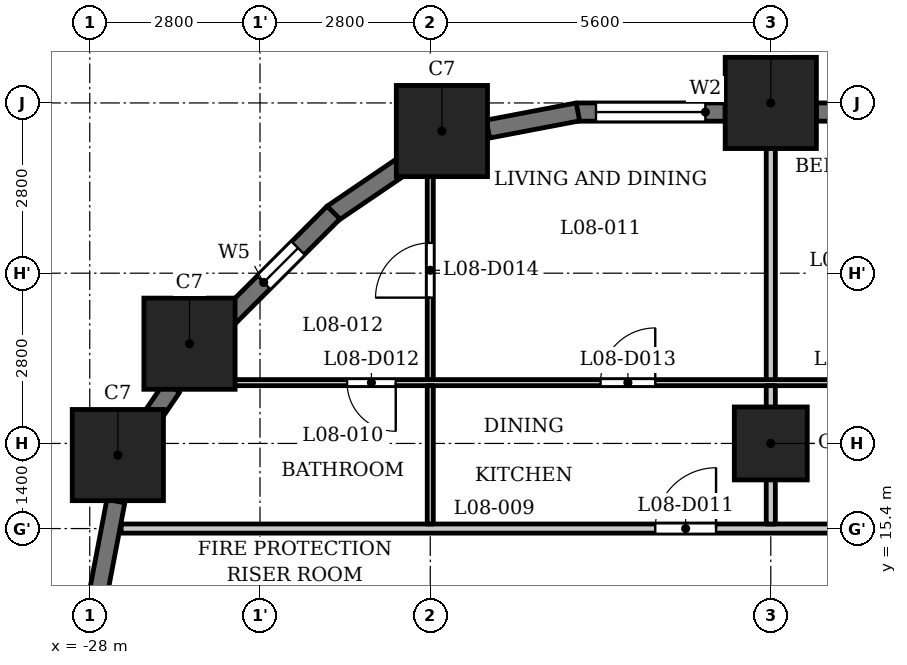
"""IFC4 building model, lengths in metres.
Left out: names, types, materials, properties, quantities, classifications, styles, units other than length and angle.
Written with IfcOpenShell. Run it as: python <this file> out.ifc"""

import sys

from ifc_helpers import new_model, si_unit, direction, frame, frame_2d, origin, origin_2d, place, context, subcontext, project, spatial, rectangle, extrude, element, fill, save


model = new_model("IFC4")
c1 = context("Model", 3, precision=1e-05, world=origin(), true_north=direction((0.0, 1.0)))
c2 = subcontext(c1, "Body", "Model", "MODEL_VIEW")
j1 = project(units=[si_unit("LENGTHUNIT", "METRE"), si_unit("PLANEANGLEUNIT", "RADIAN")], contexts=[c1])
p1 = place(None, origin())
s1 = spatial("IfcSite", under=j1, at=p1, CompositionType="ELEMENT")
p2 = place(p1, origin())
s2 = spatial("IfcBuilding", under=s1, at=p2, CompositionType="ELEMENT")
p3 = place(p2, frame((0.0, 0.0, 37.5)))
s3 = spatial("IfcBuildingStorey", under=s2, at=p3, CompositionType="ELEMENT", Elevation=37.5)
for number, where, z_axis, x_axis in (
    (1, (-16.8, 22.4, 0.0), (0.0, 0.0, 1.0), (1.0, 0.0, 0.0)),
    (2, (-22.209, 21.938, 0.0), (0.0, 0.0, 1.0), (1.0, 0.0, 0.0)),
    (3, (-26.36, 18.44, 0.0), (0.0, 0.0, 1.0), (1.0, 0.0, 0.0)),
    (4, (-27.538, 16.609, 0.0), (0.0, 0.0, 1.0), (1.0, 0.0, 0.0)),
):
    element("IfcColumn", number, at=place(p3, frame(where, z_axis=z_axis, x_axis=x_axis)), inside=s3, PredefinedType="COLUMN", context=c2, shape_type="SweptSolid", body=[
        extrude(rectangle(XDim=1.5, YDim=1.5, at=origin_2d()), origin(), (0.0, 0.0, 1.0), 3.5),
    ])
p4 = place(p3, frame((-16.8, 16.8, 0.0), z_axis=(0.0, 0.0, 1.0), x_axis=(1.0, 0.0, 0.0)))
e5 = element("IfcColumn", 5, at=p4, inside=s3, PredefinedType="COLUMN", context=c2, shape_type="SweptSolid", body=[
    extrude(rectangle(XDim=1.2, YDim=1.2, at=origin_2d()), origin(), (0.0, 0.0, 1.0), 3.5),
])
p5 = place(p3, frame((-11.95, 22.25, 0.0), z_axis=(0.0, 0.0, 1.0), x_axis=(-1.0, 0.0, 0.0)))
e6 = element("IfcWall", 6, at=p5, inside=s3, PredefinedType="SOLIDWALL", context=c2, shape_type="SweptSolid", body=[
    extrude(rectangle(XDim=4.1, YDim=0.3, at=frame_2d((2.05, 0.0))), origin(), (0.0, 0.0, 1.0), 2.35),
])
p6 = place(p5, frame((0.488, 0.0, 0.6)))
e7 = element("IfcOpeningElement", 7, at=p6, cuts=e6, PredefinedType="OPENING", context=c2, shape_type="SweptSolid", body=[
    extrude(rectangle(XDim=1.2, YDim=1.55, at=frame_2d((0.6, 0.775))), frame((0.0, 0.16, 0.0), z_axis=(0.0, -1.0, 0.0), x_axis=(1.0, 0.0, 0.0)), (0.0, 0.0, 1.0), 0.32),
])
p7 = place(p5, frame((2.613, 0.0, 0.6)))
e8 = element("IfcOpeningElement", 8, at=p7, cuts=e6, PredefinedType="OPENING", context=c2, shape_type="SweptSolid", body=[
    extrude(rectangle(XDim=1.2, YDim=1.55, at=frame_2d((0.6, 0.775))), frame((0.0, 0.16, 0.0), z_axis=(0.0, -1.0, 0.0), x_axis=(1.0, 0.0, 0.0)), (0.0, 0.0, 1.0), 0.32),
])
p8 = place(p3, frame((-17.55, 22.25, 0.0), z_axis=(0.0, 0.0, 1.0), x_axis=(-1.0, 0.0, 0.0)))
e9 = element("IfcWall", 9, at=p8, inside=s3, PredefinedType="SOLIDWALL", context=c2, shape_type="SweptSolid", body=[
    extrude(rectangle(XDim=2.45, YDim=0.3, at=frame_2d((1.225, 0.0))), origin(), (0.0, 0.0, 1.0), 2.35),
])
p9 = place(p8, frame((0.325, 0.0, 0.9)))
e10 = element("IfcOpeningElement", 10, at=p9, cuts=e9, PredefinedType="OPENING", context=c2, shape_type="SweptSolid", body=[
    extrude(rectangle(XDim=1.8, YDim=1.25, at=frame_2d((0.9, 0.625))), frame((0.0, 0.16, 0.0), z_axis=(0.0, -1.0, 0.0), x_axis=(1.0, 0.0, 0.0)), (0.0, 0.0, 1.0), 0.32),
])
for number, where, z_axis, x_axis in (
    (11, (-19.972, 22.253, 0.0), (0.0, 0.0, 1.0), (-0.982, -0.187, 0.0)),
    (12, (-22.767, 21.426, 0.0), (0.0, 0.0, 1.0), (-0.827, -0.562, 0.0)),
):
    element("IfcWall", number, at=place(p3, frame(where, z_axis=z_axis, x_axis=x_axis)), inside=s3, PredefinedType="SOLIDWALL", context=c2, shape_type="SweptSolid", body=[
        extrude(rectangle(XDim=1.506, YDim=0.3, at=frame_2d((0.753, 0.0))), origin(), (0.0, 0.0, 1.0), 2.35),
    ])
p10 = place(p3, frame((-23.991, 20.597, 0.0), z_axis=(0.0, 0.0, 1.0), x_axis=(-0.707106781187, -0.707106781187, 0.0)))
e13 = element("IfcWall", 13, at=p10, inside=s3, PredefinedType="SOLIDWALL", context=c2, shape_type="SweptSolid", body=[
    extrude(rectangle(XDim=2.45, YDim=0.3, at=frame_2d((1.225, 0.0))), origin(), (0.0, 0.0, 1.0), 2.35),
])
p11 = place(p10, frame((0.825, 0.0, 0.6)))
e14 = element("IfcOpeningElement", 14, at=p11, cuts=e13, PredefinedType="OPENING", context=c2, shape_type="SweptSolid", body=[
    extrude(rectangle(XDim=0.8, YDim=1.55, at=frame_2d((0.4, 0.775))), frame((0.0, 0.16, 0.0), z_axis=(0.0, -1.0, 0.0), x_axis=(1.0, 0.0, 0.0)), (0.0, 0.0, 1.0), 0.32),
])
p12 = place(p3, frame((-26.645, 17.727, 0.0), z_axis=(0.0, 0.0, 1.0), x_axis=(-0.562083182981, -0.827080706709, 0.0)))
e15 = element("IfcWall", 15, at=p12, inside=s3, PredefinedType="SOLIDWALL", context=c2, shape_type="SweptSolid", body=[
    extrude(rectangle(XDim=0.677, YDim=0.3, at=frame_2d((0.339, 0.0))), origin(), (0.0, 0.0, 1.0), 3.2),
])
p13 = place(p3, frame((-27.571, 15.851, 0.0), z_axis=(0.0, 0.0, 1.0), x_axis=(-0.187223837635, -0.982317277982, 0.0)))
e16 = element("IfcWall", 16, at=p13, inside=s3, PredefinedType="SOLIDWALL", context=c2, shape_type="SweptSolid", body=[
    extrude(rectangle(XDim=1.506, YDim=0.3, at=frame_2d((0.753, 0.0))), origin(), (0.0, 0.0, 1.0), 2.35),
])
p14 = place(p3, frame((-27.484, 15.4, 0.0), z_axis=(0.0, 0.0, 1.0), x_axis=(1.0, 0.0, 0.0)))
e17 = element("IfcWall", 17, at=p14, inside=s3, PredefinedType="PARTITIONING", context=c2, shape_type="SweptSolid", body=[
    extrude(rectangle(XDim=54.968, YDim=0.15, at=frame_2d((27.484, 0.0))), origin(), (0.0, 0.0, 1.0), 3.2),
])
p15 = place(p14, frame((8.784, 0.0, 0.0)))
e18 = element("IfcOpeningElement", 18, at=p15, cuts=e17, PredefinedType="OPENING", context=c2, shape_type="SweptSolid", body=[
    extrude(rectangle(XDim=1.0, YDim=2.1, at=frame_2d((0.5, 1.05))), frame((0.0, 0.085, 0.0), z_axis=(0.0, -1.0, 0.0), x_axis=(1.0, 0.0, 0.0)), (0.0, 0.0, 1.0), 0.17),
])
p16 = place(p14, frame((14.634, 0.0, 0.0)))
e19 = element("IfcOpeningElement", 19, at=p16, cuts=e17, PredefinedType="OPENING", context=c2, shape_type="SweptSolid", body=[
    extrude(rectangle(XDim=1.0, YDim=2.1, at=frame_2d((0.5, 1.05))), frame((0.0, 0.085, 0.0), z_axis=(0.0, -1.0, 0.0), x_axis=(1.0, 0.0, 0.0)), (0.0, 0.0, 1.0), 0.17),
])
p17 = place(p14, frame((23.834, 0.0, 0.0)))
e20 = element("IfcOpeningElement", 20, at=p17, cuts=e17, PredefinedType="OPENING", context=c2, shape_type="SweptSolid", body=[
    extrude(rectangle(XDim=1.0, YDim=2.1, at=frame_2d((0.5, 1.05))), frame((0.0, 0.085, 0.0), z_axis=(0.0, -1.0, 0.0), x_axis=(1.0, 0.0, 0.0)), (0.0, 0.0, 1.0), 0.17),
])
p18 = place(p14, frame((28.184, 0.0, 0.0)))
e21 = element("IfcOpeningElement", 21, at=p18, cuts=e17, PredefinedType="OPENING", context=c2, shape_type="SweptSolid", body=[
    extrude(rectangle(XDim=1.0, YDim=2.1, at=frame_2d((0.5, 1.05))), frame((0.0, 0.085, 0.0), z_axis=(0.0, -1.0, 0.0), x_axis=(1.0, 0.0, 0.0)), (0.0, 0.0, 1.0), 0.17),
])
p19 = place(p14, frame((41.884, 0.0, 0.0)))
e22 = element("IfcOpeningElement", 22, at=p19, cuts=e17, PredefinedType="OPENING", context=c2, shape_type="SweptSolid", body=[
    extrude(rectangle(XDim=1.0, YDim=2.1, at=frame_2d((0.5, 1.05))), frame((0.0, 0.085, 0.0), z_axis=(0.0, -1.0, 0.0), x_axis=(1.0, 0.0, 0.0)), (0.0, 0.0, 1.0), 0.17),
])
p20 = place(p14, frame((48.234, 0.0, 0.0)))
e23 = element("IfcOpeningElement", 23, at=p20, cuts=e17, PredefinedType="OPENING", context=c2, shape_type="SweptSolid", body=[
    extrude(rectangle(XDim=1.0, YDim=2.1, at=frame_2d((0.5, 1.05))), frame((0.0, 0.085, 0.0), z_axis=(0.0, -1.0, 0.0), x_axis=(1.0, 0.0, 0.0)), (0.0, 0.0, 1.0), 0.17),
])
p21 = place(p3, frame((-26.732, 17.8, 0.0), z_axis=(0.0, 0.0, 1.0), x_axis=(1.0, 0.0, 0.0)))
e24 = element("IfcWall", 24, at=p21, inside=s3, PredefinedType="PARTITIONING", context=c2, shape_type="SweptSolid", body=[
    extrude(rectangle(XDim=53.126, YDim=0.1, at=frame_2d((26.563, 0.0))), origin(), (0.0, 0.0, 1.0), 3.2),
])
p22 = place(p21, frame((2.964, 0.0, 0.0)))
e25 = element("IfcOpeningElement", 25, at=p22, cuts=e24, PredefinedType="OPENING", context=c2, shape_type="SweptSolid", body=[
    extrude(rectangle(XDim=0.8, YDim=2.1, at=frame_2d((0.4, 1.05))), frame((0.0, 0.06, 0.0), z_axis=(0.0, -1.0, 0.0), x_axis=(1.0, 0.0, 0.0)), (0.0, 0.0, 1.0), 0.12),
])
p23 = place(p21, frame((7.132, 0.0, 0.0)))
e26 = element("IfcOpeningElement", 26, at=p23, cuts=e24, PredefinedType="OPENING", context=c2, shape_type="SweptSolid", body=[
    extrude(rectangle(XDim=0.9, YDim=2.1, at=frame_2d((0.45, 1.05))), frame((0.0, 0.06, 0.0), z_axis=(0.0, -1.0, 0.0), x_axis=(1.0, 0.0, 0.0)), (0.0, 0.0, 1.0), 0.12),
])
p24 = place(p21, frame((19.432, 0.0, 0.0)))
e27 = element("IfcOpeningElement", 27, at=p24, cuts=e24, PredefinedType="OPENING", context=c2, shape_type="SweptSolid", body=[
    extrude(rectangle(XDim=0.8, YDim=2.1, at=frame_2d((0.4, 1.05))), frame((0.0, 0.06, 0.0), z_axis=(0.0, -1.0, 0.0), x_axis=(1.0, 0.0, 0.0)), (0.0, 0.0, 1.0), 0.12),
])
p25 = place(p21, frame((16.732, 0.0, 0.0)))
e28 = element("IfcOpeningElement", 28, at=p25, cuts=e24, PredefinedType="OPENING", context=c2, shape_type="SweptSolid", body=[
    extrude(rectangle(XDim=0.9, YDim=2.1, at=frame_2d((0.45, 1.05))), frame((0.0, 0.06, 0.0), z_axis=(0.0, -1.0, 0.0), x_axis=(1.0, 0.0, 0.0)), (0.0, 0.0, 1.0), 0.12),
])
p26 = place(p21, frame((10.982, 0.0, 0.0)))
e29 = element("IfcOpeningElement", 29, at=p26, cuts=e24, PredefinedType="OPENING", context=c2, shape_type="SweptSolid", body=[
    extrude(rectangle(XDim=0.9, YDim=2.1, at=frame_2d((0.45, 1.05))), frame((0.0, 0.06, 0.0), z_axis=(0.0, -1.0, 0.0), x_axis=(1.0, 0.0, 0.0)), (0.0, 0.0, 1.0), 0.12),
])
p27 = place(p21, frame((12.982, 0.0, 0.0)))
e30 = element("IfcOpeningElement", 30, at=p27, cuts=e24, PredefinedType="OPENING", context=c2, shape_type="SweptSolid", body=[
    extrude(rectangle(XDim=0.9, YDim=2.1, at=frame_2d((0.45, 1.05))), frame((0.0, 0.06, 0.0), z_axis=(0.0, -1.0, 0.0), x_axis=(1.0, 0.0, 0.0)), (0.0, 0.0, 1.0), 0.12),
])
p28 = place(p21, frame((25.382, 0.0, 0.0)))
e31 = element("IfcOpeningElement", 31, at=p28, cuts=e24, PredefinedType="OPENING", context=c2, shape_type="SweptSolid", body=[
    extrude(rectangle(XDim=0.8, YDim=2.1, at=frame_2d((0.4, 1.05))), frame((0.0, 0.06, 0.0), z_axis=(0.0, -1.0, 0.0), x_axis=(1.0, 0.0, 0.0)), (0.0, 0.0, 1.0), 0.12),
])
p29 = place(p21, frame((22.182, 0.0, 0.0)))
e32 = element("IfcOpeningElement", 32, at=p29, cuts=e24, PredefinedType="OPENING", context=c2, shape_type="SweptSolid", body=[
    extrude(rectangle(XDim=0.9, YDim=2.1, at=frame_2d((0.45, 1.05))), frame((0.0, 0.06, 0.0), z_axis=(0.0, -1.0, 0.0), x_axis=(1.0, 0.0, 0.0)), (0.0, 0.0, 1.0), 0.12),
])
p30 = place(p21, frame((36.232, 0.0, 0.0)))
e33 = element("IfcOpeningElement", 33, at=p30, cuts=e24, PredefinedType="OPENING", context=c2, shape_type="SweptSolid", body=[
    extrude(rectangle(XDim=0.8, YDim=2.1, at=frame_2d((0.4, 1.05))), frame((0.0, 0.06, 0.0), z_axis=(0.0, -1.0, 0.0), x_axis=(1.0, 0.0, 0.0)), (0.0, 0.0, 1.0), 0.12),
])
p31 = place(p21, frame((33.782, 0.0, 0.0)))
e34 = element("IfcOpeningElement", 34, at=p31, cuts=e24, PredefinedType="OPENING", context=c2, shape_type="SweptSolid", body=[
    extrude(rectangle(XDim=0.9, YDim=2.1, at=frame_2d((0.45, 1.05))), frame((0.0, 0.06, 0.0), z_axis=(0.0, -1.0, 0.0), x_axis=(1.0, 0.0, 0.0)), (0.0, 0.0, 1.0), 0.12),
])
p32 = place(p21, frame((27.282, 0.0, 0.0)))
e35 = element("IfcOpeningElement", 35, at=p32, cuts=e24, PredefinedType="OPENING", context=c2, shape_type="SweptSolid", body=[
    extrude(rectangle(XDim=0.9, YDim=2.1, at=frame_2d((0.45, 1.05))), frame((0.0, 0.06, 0.0), z_axis=(0.0, -1.0, 0.0), x_axis=(1.0, 0.0, 0.0)), (0.0, 0.0, 1.0), 0.12),
])
p33 = place(p21, frame((30.282, 0.0, 0.0)))
e36 = element("IfcOpeningElement", 36, at=p33, cuts=e24, PredefinedType="OPENING", context=c2, shape_type="SweptSolid", body=[
    extrude(rectangle(XDim=0.9, YDim=2.1, at=frame_2d((0.45, 1.05))), frame((0.0, 0.06, 0.0), z_axis=(0.0, -1.0, 0.0), x_axis=(1.0, 0.0, 0.0)), (0.0, 0.0, 1.0), 0.12),
])
p34 = place(p21, frame((38.582, 0.0, 0.0)))
e37 = element("IfcOpeningElement", 37, at=p34, cuts=e24, PredefinedType="OPENING", context=c2, shape_type="SweptSolid", body=[
    extrude(rectangle(XDim=0.8, YDim=2.1, at=frame_2d((0.4, 1.05))), frame((0.0, 0.06, 0.0), z_axis=(0.0, -1.0, 0.0), x_axis=(1.0, 0.0, 0.0)), (0.0, 0.0, 1.0), 0.12),
])
p35 = place(p21, frame((41.232, 0.0, 0.0)))
e38 = element("IfcOpeningElement", 38, at=p35, cuts=e24, PredefinedType="OPENING", context=c2, shape_type="SweptSolid", body=[
    extrude(rectangle(XDim=0.9, YDim=2.1, at=frame_2d((0.45, 1.05))), frame((0.0, 0.06, 0.0), z_axis=(0.0, -1.0, 0.0), x_axis=(1.0, 0.0, 0.0)), (0.0, 0.0, 1.0), 0.12),
])
p36 = place(p21, frame((51.532, 0.0, 0.0)))
e39 = element("IfcOpeningElement", 39, at=p36, cuts=e24, PredefinedType="OPENING", context=c2, shape_type="SweptSolid", body=[
    extrude(rectangle(XDim=0.8, YDim=2.1, at=frame_2d((0.4, 1.05))), frame((0.0, 0.06, 0.0), z_axis=(0.0, -1.0, 0.0), x_axis=(1.0, 0.0, 0.0)), (0.0, 0.0, 1.0), 0.12),
])
p37 = place(p21, frame((46.582, 0.0, 0.0)))
e40 = element("IfcOpeningElement", 40, at=p37, cuts=e24, PredefinedType="OPENING", context=c2, shape_type="SweptSolid", body=[
    extrude(rectangle(XDim=0.9, YDim=2.1, at=frame_2d((0.45, 1.05))), frame((0.0, 0.06, 0.0), z_axis=(0.0, -1.0, 0.0), x_axis=(1.0, 0.0, 0.0)), (0.0, 0.0, 1.0), 0.12),
])
p38 = place(p3, frame((-22.4, 15.475, 0.0), z_axis=(0.0, 0.0, 1.0), x_axis=(0.0, 1.0, 0.0)))
e41 = element("IfcWall", 41, at=p38, inside=s3, PredefinedType="PARTITIONING", context=c2, shape_type="SweptSolid", body=[
    extrude(rectangle(XDim=2.275, YDim=0.1, at=frame_2d((1.137, 0.0))), origin(), (0.0, 0.0, 1.0), 3.2),
])
p39 = place(p3, frame((-22.4, 17.85, 0.0), z_axis=(0.0, 0.0, 1.0), x_axis=(0.0, 1.0, 0.0)))
e42 = element("IfcWall", 42, at=p39, inside=s3, PredefinedType="PARTITIONING", context=c2, shape_type="SweptSolid", body=[
    extrude(rectangle(XDim=3.87, YDim=0.1, at=frame_2d((1.935, 0.0))), origin(), (0.0, 0.0, 1.0), 3.2),
])
p40 = place(p39, frame((1.348, 0.0, 0.0)))
e43 = element("IfcOpeningElement", 43, at=p40, cuts=e42, PredefinedType="OPENING", context=c2, shape_type="SweptSolid", body=[
    extrude(rectangle(XDim=0.9, YDim=2.1, at=frame_2d((0.45, 1.05))), frame((0.0, 0.06, 0.0), z_axis=(0.0, -1.0, 0.0), x_axis=(1.0, 0.0, 0.0)), (0.0, 0.0, 1.0), 0.12),
])
p41 = place(p3, frame((-16.8, 15.475, 0.0), z_axis=(0.0, 0.0, 1.0), x_axis=(0.0, 1.0, 0.0)))
e44 = element("IfcWall", 44, at=p41, inside=s3, PredefinedType="PARTITIONING", context=c2, shape_type="SweptSolid", body=[
    extrude(rectangle(XDim=2.275, YDim=0.15, at=frame_2d((1.137, 0.0))), origin(), (0.0, 0.0, 1.0), 3.2),
])
p42 = place(p3, frame((-16.8, 17.85, 0.0), z_axis=(0.0, 0.0, 1.0), x_axis=(0.0, 1.0, 0.0)))
e45 = element("IfcWall", 45, at=p42, inside=s3, PredefinedType="PARTITIONING", context=c2, shape_type="SweptSolid", body=[
    extrude(rectangle(XDim=5.28, YDim=0.15, at=frame_2d((2.64, 0.0))), origin(), (0.0, 0.0, 1.0), 3.2),
])
p43 = place(p15, origin())
e46 = element("IfcDoor", 46, at=p43, inside=s3, OperationType="SINGLE_SWING_LEFT", PredefinedType="DOOR", context=c2, shape_type="SweptSolid", body=[
    extrude(rectangle(XDim=1.0, YDim=2.1, at=frame_2d((0.5, 1.05))), frame((0.0, 0.025, 0.0), z_axis=(0.0, -1.0, 0.0), x_axis=(1.0, 0.0, 0.0)), (0.0, 0.0, 1.0), 0.05),
])
fill(e18, e46)
p44 = place(p22, origin())
e47 = element("IfcDoor", 47, at=p44, inside=s3, OperationType="SINGLE_SWING_RIGHT", PredefinedType="DOOR", context=c2, shape_type="SweptSolid", body=[
    extrude(rectangle(XDim=0.8, YDim=2.1, at=frame_2d((0.4, 1.05))), frame((0.0, 0.025, 0.0), z_axis=(0.0, -1.0, 0.0), x_axis=(1.0, 0.0, 0.0)), (0.0, 0.0, 1.0), 0.05),
])
fill(e25, e47)
p45 = place(p23, origin())
e48 = element("IfcDoor", 48, at=p45, inside=s3, OperationType="SINGLE_SWING_LEFT", PredefinedType="DOOR", context=c2, shape_type="SweptSolid", body=[
    extrude(rectangle(XDim=0.9, YDim=2.1, at=frame_2d((0.45, 1.05))), frame((0.0, 0.025, 0.0), z_axis=(0.0, -1.0, 0.0), x_axis=(1.0, 0.0, 0.0)), (0.0, 0.0, 1.0), 0.05),
])
fill(e26, e48)
p46 = place(p40, origin())
e49 = element("IfcDoor", 49, at=p46, inside=s3, OperationType="SINGLE_SWING_RIGHT", PredefinedType="DOOR", context=c2, shape_type="SweptSolid", body=[
    extrude(rectangle(XDim=0.9, YDim=2.1, at=frame_2d((0.45, 1.05))), frame((0.0, 0.025, 0.0), z_axis=(0.0, -1.0, 0.0), x_axis=(1.0, 0.0, 0.0)), (0.0, 0.0, 1.0), 0.05),
])
fill(e43, e49)
p47 = place(p9, origin())
e50 = element("IfcWindow", 50, at=p47, inside=s3, PartitioningType="SINGLE_PANEL", PredefinedType="WINDOW", context=c2, shape_type="SweptSolid", body=[
    extrude(rectangle(XDim=1.8, YDim=1.25, at=frame_2d((0.9, 0.625))), frame((0.0, 0.03, 0.0), z_axis=(0.0, -1.0, 0.0), x_axis=(1.0, 0.0, 0.0)), (0.0, 0.0, 1.0), 0.06),
])
fill(e10, e50)
p48 = place(p11, origin())
e51 = element("IfcWindow", 51, at=p48, inside=s3, PartitioningType="SINGLE_PANEL", PredefinedType="WINDOW", context=c2, shape_type="SweptSolid", body=[
    extrude(rectangle(XDim=0.8, YDim=1.55, at=frame_2d((0.4, 0.775))), frame((0.0, 0.03, 0.0), z_axis=(0.0, -1.0, 0.0), x_axis=(1.0, 0.0, 0.0)), (0.0, 0.0, 1.0), 0.06),
])
fill(e14, e51)
save(model, sys.argv[1])
